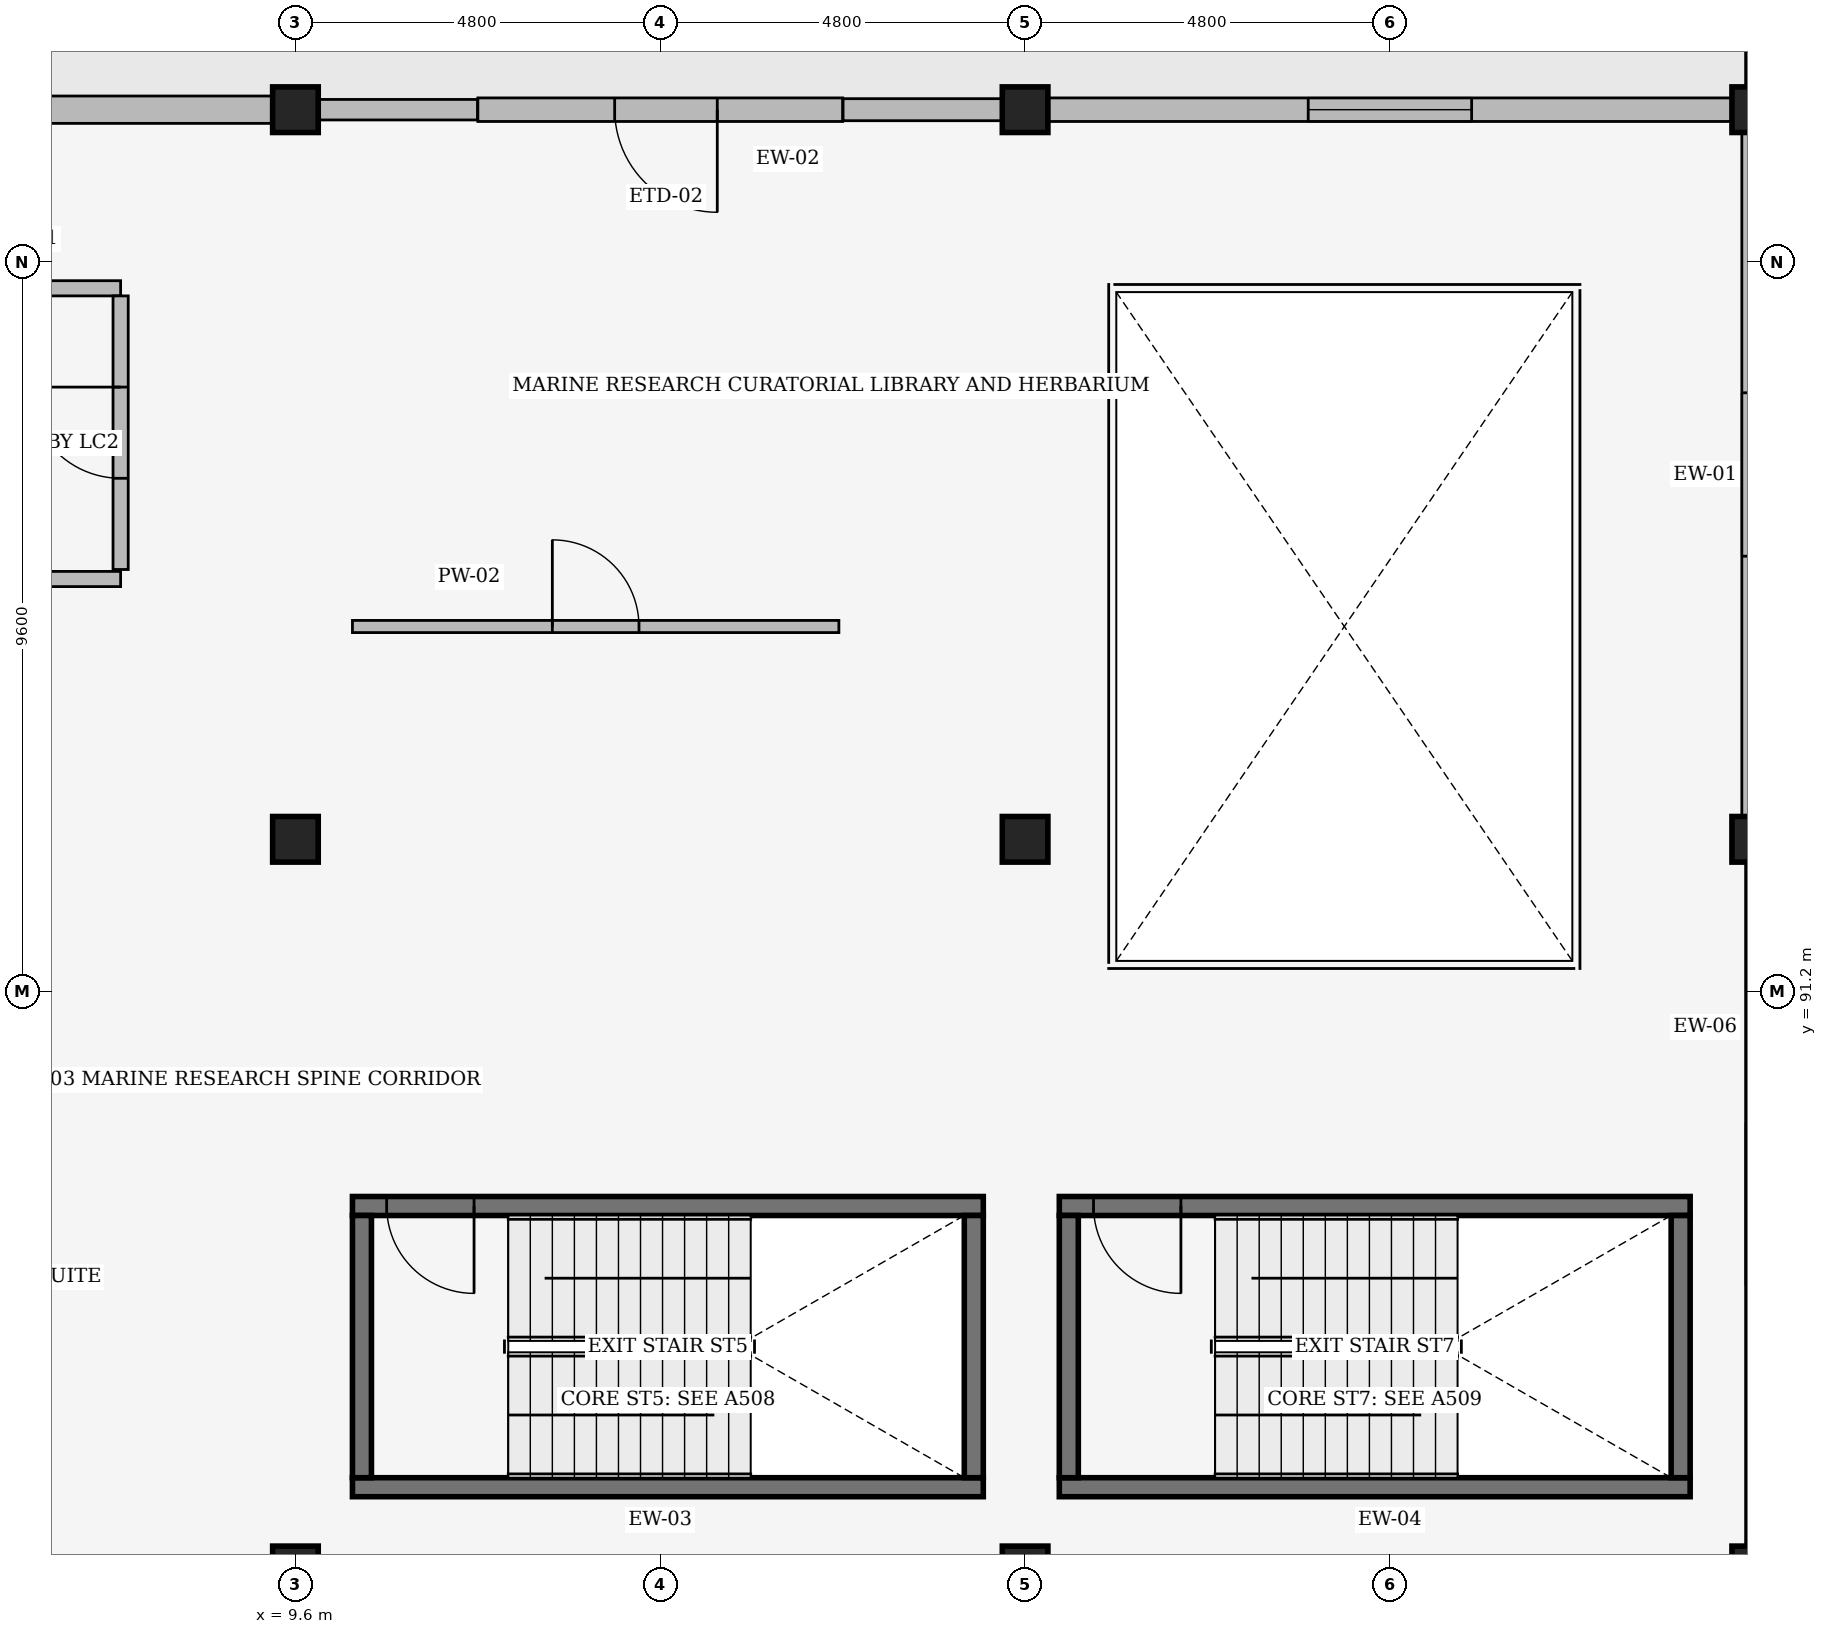
"""IFC4 building model, lengths in metres.
Left out: names, types, materials, properties, quantities, classifications, styles, units other than length and angle.
Written with IfcOpenShell. Run it as: python <this file> out.ifc"""

import sys

from ifc_helpers import new_model, si_unit, direction, frame, frame_2d, origin, origin_2d, place, context, subcontext, project, spatial, rectangle, extrude, element, fill, save


model = new_model("IFC4")
c1 = context("Model", 3, precision=1e-05, world=origin(), true_north=direction((0.0, 1.0)))
c2 = subcontext(c1, "Body", "Model", "MODEL_VIEW")
j1 = project(units=[si_unit("LENGTHUNIT", "METRE"), si_unit("PLANEANGLEUNIT", "RADIAN")], contexts=[c1])
p1 = place(None, origin())
s1 = spatial("IfcSite", under=j1, at=p1, CompositionType="ELEMENT")
p2 = place(p1, origin())
s2 = spatial("IfcBuilding", under=s1, at=p2, CompositionType="ELEMENT")
p3 = place(p2, frame((0.0, 0.0, 15.3)))
s3 = spatial("IfcBuildingStorey", under=s2, at=p3, CompositionType="ELEMENT", Elevation=15.3)
for number, where, z_axis, x_axis in (
    (1, (9.6, 83.6, 0.0), (0.0, 0.0, 1.0), (1.0, 0.0, 0.0)),
    (2, (9.6, 93.2, 0.0), (0.0, 0.0, 1.0), (1.0, 0.0, 0.0)),
    (3, (9.6, 102.8, 0.0), (0.0, 0.0, 1.0), (1.0, 0.0, 0.0)),
    (4, (19.2, 83.6, 0.0), (0.0, 0.0, 1.0), (1.0, 0.0, 0.0)),
    (5, (19.2, 93.2, 0.0), (0.0, 0.0, 1.0), (1.0, 0.0, 0.0)),
    (6, (19.2, 102.8, 0.0), (0.0, 0.0, 1.0), (1.0, 0.0, 0.0)),
    (7, (28.8, 83.6, 0.0), (0.0, 0.0, 1.0), (1.0, 0.0, 0.0)),
    (8, (28.8, 93.2, 0.0), (0.0, 0.0, 1.0), (1.0, 0.0, 0.0)),
    (9, (28.8, 102.8, 0.0), (0.0, 0.0, 1.0), (1.0, 0.0, 0.0)),
):
    element("IfcColumn", number, at=place(p3, frame(where, z_axis=z_axis, x_axis=x_axis)), inside=s3, PredefinedType="COLUMN", context=c2, shape_type="SweptSolid", body=[
        extrude(rectangle(XDim=0.6, YDim=0.6, at=origin_2d()), origin(), (0.0, 0.0, 1.0), 4.5),
    ])
p4 = place(p3, frame((16.8, 102.8, 0.0), z_axis=(0.0, 0.0, 1.0), x_axis=(-1.0, 0.0, 0.0)))
e10 = element("IfcWall", 10, at=p4, inside=s3, PredefinedType="SOLIDWALL", context=c2, shape_type="SweptSolid", body=[
    extrude(rectangle(XDim=4.8, YDim=0.31, at=frame_2d((2.4, 0.0))), origin(), (0.0, 0.0, 1.0), 3.983),
])
p5 = place(p4, frame((3.0, 0.0, 0.0), z_axis=(0.0, 0.0, 1.0), x_axis=(-1.0, 0.0, 0.0)))
e11 = element("IfcOpeningElement", 11, at=p5, cuts=e10, PredefinedType="OPENING", context=c2, shape_type="SweptSolid", body=[
    extrude(rectangle(XDim=1.35, YDim=2.2, at=frame_2d((0.675, 1.1))), frame((0.0, 0.165, 0.0), z_axis=(0.0, -1.0, 0.0), x_axis=(1.0, 0.0, 0.0)), (0.0, 0.0, 1.0), 0.33),
])
p6 = place(p3, frame((28.8, 83.908, 0.0), z_axis=(0.0, 0.0, 1.0), x_axis=(0.0, 1.0, 0.0)))
e12 = element("IfcWall", 12, at=p6, inside=s3, PredefinedType="SOLIDWALL", context=c2, shape_type="SweptSolid", body=[
    extrude(rectangle(XDim=8.984, YDim=0.24, at=frame_2d((4.492, 0.0))), origin(), (0.0, 0.0, 1.0), 3.823),
])
p7 = place(p6, frame((3.417, 0.0, 0.95)))
e13 = element("IfcOpeningElement", 13, at=p7, cuts=e12, PredefinedType="OPENING", context=c2, shape_type="SweptSolid", body=[
    extrude(rectangle(XDim=2.15, YDim=1.2, at=frame_2d((1.075, 0.6))), frame((0.0, 0.13, 0.0), z_axis=(0.0, -1.0, 0.0), x_axis=(1.0, 0.0, 0.0)), (0.0, 0.0, 1.0), 0.26),
])
p8 = place(p3, frame((28.8, 93.508, 0.0), z_axis=(0.0, 0.0, 1.0), x_axis=(0.0, 1.0, 0.0)))
e14 = element("IfcWall", 14, at=p8, inside=s3, PredefinedType="SOLIDWALL", context=c2, shape_type="SweptSolid", body=[
    extrude(rectangle(XDim=8.984, YDim=0.34, at=frame_2d((4.492, 0.0))), origin(), (0.0, 0.0, 1.0), 3.823),
])
p9 = place(p8, frame((3.417, 0.0, 0.95)))
e15 = element("IfcOpeningElement", 15, at=p9, cuts=e14, PredefinedType="OPENING", context=c2, shape_type="SweptSolid", body=[
    extrude(rectangle(XDim=2.15, YDim=1.5, at=frame_2d((1.075, 0.75))), frame((0.0, 0.18, 0.0), z_axis=(0.0, -1.0, 0.0), x_axis=(1.0, 0.0, 0.0)), (0.0, 0.0, 1.0), 0.36),
])
p10 = place(p3, frame((28.492, 102.8, 0.0), z_axis=(0.0, 0.0, 1.0), x_axis=(-1.0, 0.0, 0.0)))
e16 = element("IfcWall", 16, at=p10, inside=s3, PredefinedType="SOLIDWALL", context=c2, shape_type="SweptSolid", body=[
    extrude(rectangle(XDim=8.984, YDim=0.31, at=frame_2d((4.492, 0.0))), origin(), (0.0, 0.0, 1.0), 3.878),
])
p11 = place(p10, frame((3.417, 0.0, 0.95)))
e17 = element("IfcOpeningElement", 17, at=p11, cuts=e16, PredefinedType="OPENING", context=c2, shape_type="SweptSolid", body=[
    extrude(rectangle(XDim=2.15, YDim=1.8, at=frame_2d((1.075, 0.9))), frame((0.0, 0.165, 0.0), z_axis=(0.0, -1.0, 0.0), x_axis=(1.0, 0.0, 0.0)), (0.0, 0.0, 1.0), 0.33),
])
p12 = place(p3, frame((18.892, 102.8, 0.0), z_axis=(0.0, 0.0, 1.0), x_axis=(-1.0, 0.0, 0.0)))
e18 = element("IfcWall", 18, at=p12, inside=s3, PredefinedType="SOLIDWALL", context=c2, shape_type="SweptSolid", body=[
    extrude(rectangle(XDim=2.087, YDim=0.29, at=frame_2d((1.043, 0.0))), origin(), (0.0, 0.0, 1.0), 3.983),
])
p13 = place(p3, frame((11.995, 102.8, 0.0), z_axis=(0.0, 0.0, 1.0), x_axis=(-1.0, 0.0, 0.0)))
e19 = element("IfcWall", 19, at=p13, inside=s3, PredefinedType="SOLIDWALL", context=c2, shape_type="SweptSolid", body=[
    extrude(rectangle(XDim=2.087, YDim=0.27, at=frame_2d((1.043, 0.0))), origin(), (0.0, 0.0, 1.0), 3.983),
])
p14 = place(p3, frame((9.292, 102.8, 0.0), z_axis=(0.0, 0.0, 1.0), x_axis=(-1.0, 0.0, 0.0)))
e20 = element("IfcWall", 20, at=p14, inside=s3, PredefinedType="SOLIDWALL", context=c2, shape_type="SweptSolid", body=[
    extrude(rectangle(XDim=8.984, YDim=0.36, at=frame_2d((4.492, 0.0))), origin(), (0.0, 0.0, 1.0), 3.878),
])
p15 = place(p14, frame((3.417, 0.0, 0.95)))
e21 = element("IfcOpeningElement", 21, at=p15, cuts=e20, PredefinedType="OPENING", context=c2, shape_type="SweptSolid", body=[
    extrude(rectangle(XDim=2.15, YDim=2.1, at=frame_2d((1.075, 1.05))), frame((0.0, 0.19, 0.0), z_axis=(0.0, -1.0, 0.0), x_axis=(1.0, 0.0, 0.0)), (0.0, 0.0, 1.0), 0.38),
])
p16 = place(p3, frame((10.35, 84.675, 0.0), z_axis=(0.0, 0.0, 1.0), x_axis=(1.0, 0.0, 0.0)))
e22 = element("IfcWall", 22, at=p16, inside=s3, PredefinedType="SHEAR", context=c2, shape_type="SweptSolid", body=[
    extrude(rectangle(XDim=8.3, YDim=0.25, at=frame_2d((4.15, 0.0))), origin(), (0.0, 0.0, 1.0), 4.22),
])
p17 = place(p3, frame((18.65, 88.375, 0.0), z_axis=(0.0, 0.0, 1.0), x_axis=(-1.0, 0.0, 0.0)))
e23 = element("IfcWall", 23, at=p17, inside=s3, PredefinedType="SHEAR", context=c2, shape_type="SweptSolid", body=[
    extrude(rectangle(XDim=8.3, YDim=0.25, at=frame_2d((4.15, 0.0))), origin(), (0.0, 0.0, 1.0), 4.22),
])
p18 = place(p17, frame((7.85, 0.0, 0.0), z_axis=(0.0, 0.0, 1.0), x_axis=(-1.0, 0.0, 0.0)))
e24 = element("IfcOpeningElement", 24, at=p18, cuts=e23, PredefinedType="OPENING", context=c2, shape_type="SweptSolid", body=[
    extrude(rectangle(XDim=1.15, YDim=2.2, at=frame_2d((0.575, 1.1))), frame((0.0, 0.135, 0.0), z_axis=(0.0, -1.0, 0.0), x_axis=(1.0, 0.0, 0.0)), (0.0, 0.0, 1.0), 0.27),
])
for number, where, z_axis, x_axis in (
    (25, (10.475, 88.25, 0.0), (0.0, 0.0, 1.0), (0.0, -1.0, 0.0)),
    (26, (18.525, 84.8, 0.0), (0.0, 0.0, 1.0), (0.0, 1.0, 0.0)),
):
    element("IfcWall", number, at=place(p3, frame(where, z_axis=z_axis, x_axis=x_axis)), inside=s3, PredefinedType="SHEAR", context=c2, shape_type="SweptSolid", body=[
        extrude(rectangle(XDim=3.45, YDim=0.25, at=frame_2d((1.725, 0.0))), origin(), (0.0, 0.0, 1.0), 4.22),
    ])
p19 = place(p3, frame((19.65, 84.675, 0.0), z_axis=(0.0, 0.0, 1.0), x_axis=(1.0, 0.0, 0.0)))
e27 = element("IfcWall", 27, at=p19, inside=s3, PredefinedType="SHEAR", context=c2, shape_type="SweptSolid", body=[
    extrude(rectangle(XDim=8.3, YDim=0.25, at=frame_2d((4.15, 0.0))), origin(), (0.0, 0.0, 1.0), 4.22),
])
p20 = place(p3, frame((27.95, 88.375, 0.0), z_axis=(0.0, 0.0, 1.0), x_axis=(-1.0, 0.0, 0.0)))
e28 = element("IfcWall", 28, at=p20, inside=s3, PredefinedType="SHEAR", context=c2, shape_type="SweptSolid", body=[
    extrude(rectangle(XDim=8.3, YDim=0.25, at=frame_2d((4.15, 0.0))), origin(), (0.0, 0.0, 1.0), 4.22),
])
p21 = place(p20, frame((7.85, 0.0, 0.0), z_axis=(0.0, 0.0, 1.0), x_axis=(-1.0, 0.0, 0.0)))
e29 = element("IfcOpeningElement", 29, at=p21, cuts=e28, PredefinedType="OPENING", context=c2, shape_type="SweptSolid", body=[
    extrude(rectangle(XDim=1.15, YDim=2.2, at=frame_2d((0.575, 1.1))), frame((0.0, 0.135, 0.0), z_axis=(0.0, -1.0, 0.0), x_axis=(1.0, 0.0, 0.0)), (0.0, 0.0, 1.0), 0.27),
])
for number, where, z_axis, x_axis in (
    (30, (19.775, 88.25, 0.0), (0.0, 0.0, 1.0), (0.0, -1.0, 0.0)),
    (31, (27.825, 84.8, 0.0), (0.0, 0.0, 1.0), (0.0, 1.0, 0.0)),
):
    element("IfcWall", number, at=place(p3, frame(where, z_axis=z_axis, x_axis=x_axis)), inside=s3, PredefinedType="SHEAR", context=c2, shape_type="SweptSolid", body=[
        extrude(rectangle(XDim=3.45, YDim=0.25, at=frame_2d((1.725, 0.0))), origin(), (0.0, 0.0, 1.0), 4.22),
    ])
p22 = place(p3, frame((2.1, 100.45, 0.0), z_axis=(0.0, 0.0, 1.0), x_axis=(1.0, 0.0, 0.0)))
e32 = element("IfcWall", 32, at=p22, inside=s3, PredefinedType="PARTITIONING", context=c2, shape_type="SweptSolid", body=[
    extrude(rectangle(XDim=5.2, YDim=0.2, at=frame_2d((2.6, 0.0))), origin(), (0.0, 0.0, 1.0), 3.833),
])
p23 = place(p22, frame((1.6, 0.0, 0.0)))
e33 = element("IfcOpeningElement", 33, at=p23, cuts=e32, PredefinedType="OPENING", context=c2, shape_type="SweptSolid", body=[
    extrude(rectangle(XDim=1.2, YDim=2.2, at=frame_2d((0.6, 1.1))), frame((0.0, 0.11, 0.0), z_axis=(0.0, -1.0, 0.0), x_axis=(1.0, 0.0, 0.0)), (0.0, 0.0, 1.0), 0.22),
])
p24 = place(p3, frame((7.3, 96.75, 0.0), z_axis=(0.0, 0.0, 1.0), x_axis=(0.0, 1.0, 0.0)))
e34 = element("IfcWall", 34, at=p24, inside=s3, PredefinedType="PARTITIONING", context=c2, shape_type="SweptSolid", body=[
    extrude(rectangle(XDim=3.6, YDim=0.2, at=frame_2d((1.8, 0.0))), origin(), (0.0, 0.0, 1.0), 3.769),
])
p25 = place(p24, frame((1.2, 0.0, 0.0)))
e35 = element("IfcOpeningElement", 35, at=p25, cuts=e34, PredefinedType="OPENING", context=c2, shape_type="SweptSolid", body=[
    extrude(rectangle(XDim=1.2, YDim=2.2, at=frame_2d((0.6, 1.1))), frame((0.0, 0.11, 0.0), z_axis=(0.0, -1.0, 0.0), x_axis=(1.0, 0.0, 0.0)), (0.0, 0.0, 1.0), 0.22),
])
p26 = place(p3, frame((5.25, 96.625, 0.0), z_axis=(0.0, 0.0, 1.0), x_axis=(1.0, 0.0, 0.0)))
e36 = element("IfcWall", 36, at=p26, inside=s3, PredefinedType="PARTITIONING", context=c2, shape_type="SweptSolid", body=[
    extrude(rectangle(XDim=2.05, YDim=0.2, at=frame_2d((1.025, 0.0))), origin(), (0.0, 0.0, 1.0), 4.14),
])
p27 = place(p3, frame((10.35, 96.0, 0.0), z_axis=(0.0, 0.0, 1.0), x_axis=(1.0, 0.0, 0.0)))
e37 = element("IfcWall", 37, at=p27, inside=s3, PredefinedType="PARTITIONING", context=c2, shape_type="SweptSolid", body=[
    extrude(rectangle(XDim=6.4, YDim=0.16, at=frame_2d((3.2, 0.0))), origin(), (0.0, 0.0, 1.0), 3.876),
])
p28 = place(p27, frame((2.63, 0.0, 0.0)))
e38 = element("IfcOpeningElement", 38, at=p28, cuts=e37, PredefinedType="OPENING", context=c2, shape_type="SweptSolid", body=[
    extrude(rectangle(XDim=1.14, YDim=2.22, at=frame_2d((0.57, 1.11))), frame((0.0, 0.09, 0.0), z_axis=(0.0, -1.0, 0.0), x_axis=(1.0, 0.0, 0.0)), (0.0, 0.0, 1.0), 0.18),
])
p29 = place(p5, origin())
e39 = element("IfcDoor", 39, at=p29, inside=s3, OperationType="SINGLE_SWING_RIGHT", PredefinedType="DOOR", context=c2, shape_type="SweptSolid", body=[
    extrude(rectangle(XDim=1.35, YDim=2.2, at=frame_2d((0.675, 1.1))), frame((0.0, 0.025, 0.0), z_axis=(0.0, -1.0, 0.0), x_axis=(1.0, 0.0, 0.0)), (0.0, 0.0, 1.0), 0.05),
])
fill(e11, e39)
p30 = place(p11, origin())
e40 = element("IfcWindow", 40, at=p30, inside=s3, PartitioningType="SINGLE_PANEL", PredefinedType="WINDOW", context=c2, shape_type="SweptSolid", body=[
    extrude(rectangle(XDim=2.15, YDim=1.8, at=frame_2d((1.075, 0.9))), frame((0.0, 0.03, 0.0), z_axis=(0.0, -1.0, 0.0), x_axis=(1.0, 0.0, 0.0)), (0.0, 0.0, 1.0), 0.06),
])
fill(e17, e40)
p31 = place(p18, origin())
e41 = element("IfcDoor", 41, at=p31, inside=s3, OperationType="SINGLE_SWING_RIGHT", PredefinedType="DOOR", context=c2, shape_type="SweptSolid", body=[
    extrude(rectangle(XDim=1.15, YDim=2.2, at=frame_2d((0.575, 1.1))), frame((0.0, 0.025, 0.0), z_axis=(0.0, -1.0, 0.0), x_axis=(1.0, 0.0, 0.0)), (0.0, 0.0, 1.0), 0.05),
])
fill(e24, e41)
p32 = place(p21, origin())
e42 = element("IfcDoor", 42, at=p32, inside=s3, OperationType="SINGLE_SWING_RIGHT", PredefinedType="DOOR", context=c2, shape_type="SweptSolid", body=[
    extrude(rectangle(XDim=1.15, YDim=2.2, at=frame_2d((0.575, 1.1))), frame((0.0, 0.025, 0.0), z_axis=(0.0, -1.0, 0.0), x_axis=(1.0, 0.0, 0.0)), (0.0, 0.0, 1.0), 0.05),
])
fill(e29, e42)
p33 = place(p25, origin())
e43 = element("IfcDoor", 43, at=p33, inside=s3, OperationType="SINGLE_SWING_RIGHT", PredefinedType="DOOR", context=c2, shape_type="SweptSolid", body=[
    extrude(rectangle(XDim=1.2, YDim=2.2, at=frame_2d((0.6, 1.1))), frame((0.0, 0.025, 0.0), z_axis=(0.0, -1.0, 0.0), x_axis=(1.0, 0.0, 0.0)), (0.0, 0.0, 1.0), 0.05),
])
fill(e35, e43)
p34 = place(p28, origin())
e44 = element("IfcDoor", 44, at=p34, inside=s3, OperationType="SINGLE_SWING_LEFT", PredefinedType="DOOR", context=c2, shape_type="SweptSolid", body=[
    extrude(rectangle(XDim=1.14, YDim=2.22, at=frame_2d((0.57, 1.11))), frame((0.0, 0.025, 0.0), z_axis=(0.0, -1.0, 0.0), x_axis=(1.0, 0.0, 0.0)), (0.0, 0.0, 1.0), 0.05),
])
fill(e38, e44)
save(model, sys.argv[1])
